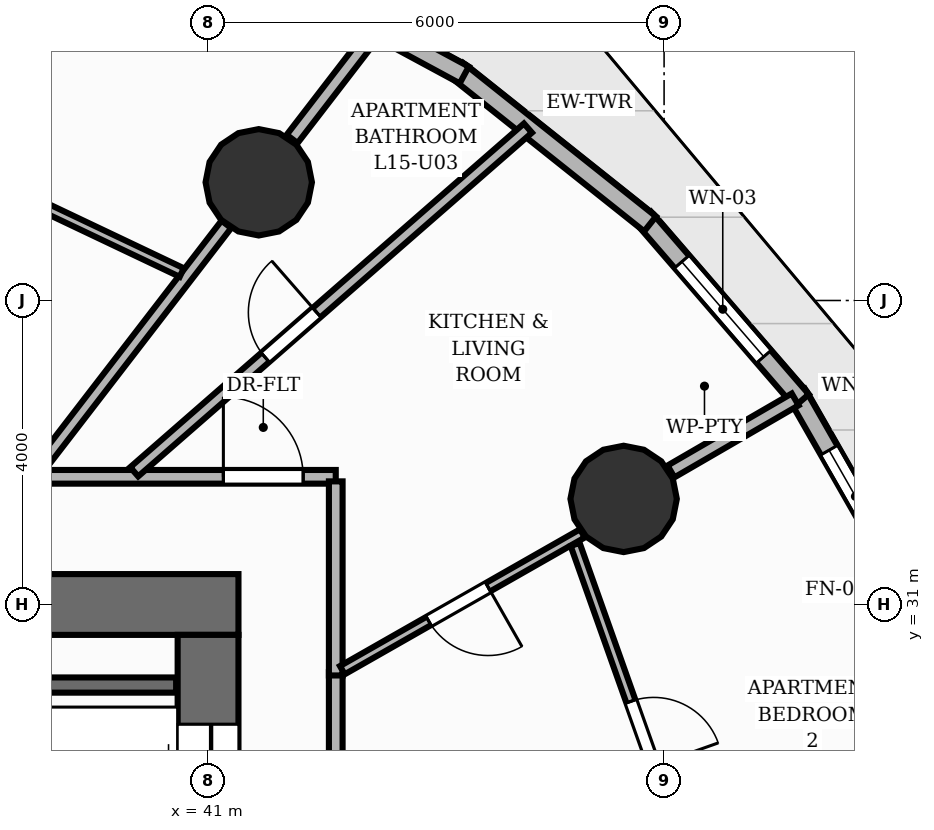
"""IFC4 building model, lengths in metres.
Left out: names, types, materials, properties, quantities, classifications, styles, units other than length and angle.
Written with IfcOpenShell. Run it as: python <this file> out.ifc"""

import sys

from ifc_helpers import new_model, si_unit, direction, frame, frame_2d, origin, origin_2d, place, context, subcontext, project, spatial, rectangle, circle, extrude, element, fill, save


model = new_model("IFC4")
c1 = context("Model", 3, precision=1e-05, world=origin(), true_north=direction((0.0, 1.0)))
c2 = subcontext(c1, "Body", "Model", "MODEL_VIEW")
j1 = project(units=[si_unit("LENGTHUNIT", "METRE"), si_unit("PLANEANGLEUNIT", "RADIAN")], contexts=[c1])
p1 = place(None, origin())
s1 = spatial("IfcSite", under=j1, at=p1, CompositionType="ELEMENT")
p2 = place(p1, origin())
s2 = spatial("IfcBuilding", under=s1, at=p2, CompositionType="ELEMENT")
p3 = place(p2, frame((0.0, 0.0, 53.6)))
s3 = spatial("IfcBuildingStorey", under=s2, at=p3, CompositionType="ELEMENT", Elevation=53.6)
p4 = place(p3, frame((22.6, 31.0, 0.0), z_axis=(0.0, 0.0, 1.0), x_axis=(1.0, 0.0, 0.0)))
e1 = element("IfcWall", 1, at=p4, inside=s3, PredefinedType="SHEAR", context=c2, shape_type="SweptSolid", body=[
    extrude(rectangle(XDim=18.8, YDim=0.8, at=frame_2d((9.4, 0.0))), origin(), (0.0, 0.0, 1.0), 3.2),
])
p5 = place(p4, frame((11.8, 0.0, 0.0)))
e2 = element("IfcOpeningElement", 2, at=p5, cuts=e1, PredefinedType="OPENING", context=c2, shape_type="SweptSolid", body=[
    extrude(rectangle(XDim=1.1, YDim=2.15, at=frame_2d((0.55, 1.075))), frame((0.0, 0.41, 0.0), z_axis=(0.0, -1.0, 0.0), x_axis=(1.0, 0.0, 0.0)), (0.0, 0.0, 1.0), 0.82),
])
p6 = place(p3, frame((41.0, 17.4, 0.0), z_axis=(0.0, 0.0, 1.0), x_axis=(0.0, 1.0, 0.0)))
e3 = element("IfcWall", 3, at=p6, inside=s3, PredefinedType="SHEAR", context=c2, shape_type="SweptSolid", body=[
    extrude(rectangle(XDim=13.2, YDim=0.8, at=frame_2d((6.6, 0.0))), origin(), (0.0, 0.0, 1.0), 3.2),
])
p7 = place(p6, frame((1.175, 0.0, 0.0)))
e4 = element("IfcOpeningElement", 4, at=p7, cuts=e3, PredefinedType="OPENING", context=c2, shape_type="SweptSolid", body=[
    extrude(rectangle(XDim=1.05, YDim=2.15, at=frame_2d((0.525, 1.075))), frame((0.0, 0.41, 0.0), z_axis=(0.0, -1.0, 0.0), x_axis=(1.0, 0.0, 0.0)), (0.0, 0.0, 1.0), 0.82),
])
p8 = place(p6, frame((4.425, 0.0, 0.0)))
e5 = element("IfcOpeningElement", 5, at=p8, cuts=e3, PredefinedType="OPENING", context=c2, shape_type="SweptSolid", body=[
    extrude(rectangle(XDim=1.05, YDim=2.15, at=frame_2d((0.525, 1.075))), frame((0.0, 0.41, 0.0), z_axis=(0.0, -1.0, 0.0), x_axis=(1.0, 0.0, 0.0)), (0.0, 0.0, 1.0), 0.82),
])
p9 = place(p6, frame((7.725, 0.0, 0.0)))
e6 = element("IfcOpeningElement", 6, at=p9, cuts=e3, PredefinedType="OPENING", context=c2, shape_type="SweptSolid", body=[
    extrude(rectangle(XDim=1.05, YDim=2.15, at=frame_2d((0.525, 1.075))), frame((0.0, 0.41, 0.0), z_axis=(0.0, -1.0, 0.0), x_axis=(1.0, 0.0, 0.0)), (0.0, 0.0, 1.0), 0.82),
])
p10 = place(p6, frame((10.975, 0.0, 0.0)))
e7 = element("IfcOpeningElement", 7, at=p10, cuts=e3, PredefinedType="OPENING", context=c2, shape_type="SweptSolid", body=[
    extrude(rectangle(XDim=1.05, YDim=2.15, at=frame_2d((0.525, 1.075))), frame((0.0, 0.41, 0.0), z_axis=(0.0, -1.0, 0.0), x_axis=(1.0, 0.0, 0.0)), (0.0, 0.0, 1.0), 0.82),
])
for number, where, z_axis, x_axis in (
    (8, (46.468, 32.389, 0.0), (0.0, 0.0, 1.0), (1.0, 0.0, 0.0)),
    (9, (41.667, 36.555, 0.0), (0.0, 0.0, 1.0), (1.0, 0.0, 0.0)),
):
    element("IfcColumn", number, at=place(p3, frame(where, z_axis=z_axis, x_axis=x_axis)), inside=s3, PredefinedType="COLUMN", context=c2, shape_type="SweptSolid", body=[
        extrude(circle(Radius=0.7, at=origin_2d()), origin(), (0.0, 0.0, 1.0), 3.2),
    ])
p11 = place(p3, frame((48.744, 33.777, 0.0), z_axis=(0.0, 0.0, 1.0), x_axis=(0.496155788519, -0.868233513243, 0.0)))
e10 = element("IfcWall", 10, at=p11, inside=s3, PredefinedType="SOLIDWALL", context=c2, shape_type="SweptSolid", body=[
    extrude(rectangle(XDim=3.121, YDim=0.25, at=frame_2d((1.56, 0.0))), origin(), (0.0, 0.0, 1.0), 2.96),
])
p12 = place(p11, frame((0.86, 0.0, 0.85)))
e11 = element("IfcOpeningElement", 11, at=p12, cuts=e10, PredefinedType="OPENING", context=c2, shape_type="SweptSolid", body=[
    extrude(rectangle(XDim=1.4, YDim=1.55, at=frame_2d((0.7, 0.775))), frame((0.0, 0.135, 0.0), z_axis=(0.0, -1.0, 0.0), x_axis=(1.0, 0.0, 0.0)), (0.0, 0.0, 1.0), 0.27),
])
p13 = place(p3, frame((46.734, 36.086, 0.0), z_axis=(0.0, 0.0, 1.0), x_axis=(0.653770062489, -0.75669327035, 0.0)))
e12 = element("IfcWall", 12, at=p13, inside=s3, PredefinedType="SOLIDWALL", context=c2, shape_type="SweptSolid", body=[
    extrude(rectangle(XDim=3.174, YDim=0.25, at=frame_2d((1.587, 0.0))), origin(), (0.0, 0.0, 1.0), 2.96),
])
p14 = place(p13, frame((0.762, 0.0, 0.85)))
e13 = element("IfcOpeningElement", 13, at=p14, cuts=e12, PredefinedType="OPENING", context=c2, shape_type="SweptSolid", body=[
    extrude(rectangle(XDim=1.65, YDim=1.55, at=frame_2d((0.825, 0.775))), frame((0.0, 0.135, 0.0), z_axis=(0.0, -1.0, 0.0), x_axis=(1.0, 0.0, 0.0)), (0.0, 0.0, 1.0), 0.27),
])
p15 = place(p3, frame((44.278, 38.029, 0.0), z_axis=(0.0, 0.0, 1.0), x_axis=(0.78232767864, -0.622867083119, 0.0)))
e14 = element("IfcWall", 14, at=p15, inside=s3, PredefinedType="SOLIDWALL", context=c2, shape_type="SweptSolid", body=[
    extrude(rectangle(XDim=3.244, YDim=0.25, at=frame_2d((1.622, 0.0))), origin(), (0.0, 0.0, 1.0), 2.96),
])
p16 = place(p3, frame((41.448, 39.546, 0.0), z_axis=(0.0, 0.0, 1.0), x_axis=(0.879811992908, -0.475321845843, 0.0)))
e15 = element("IfcWall", 15, at=p16, inside=s3, PredefinedType="SOLIDWALL", context=c2, shape_type="SweptSolid", body=[
    extrude(rectangle(XDim=3.323, YDim=0.25, at=frame_2d((1.661, 0.0))), origin(), (0.0, 0.0, 1.0), 2.96),
])
p17 = place(p3, frame((38.87, 29.94, 0.0), z_axis=(0.0, 0.0, 1.0), x_axis=(1.0, 0.0, 0.0)))
e16 = element("IfcWall", 16, at=p17, inside=s3, PredefinedType="SHEAR", context=c2, shape_type="SweptSolid", body=[
    extrude(rectangle(XDim=1.71, YDim=0.2, at=frame_2d((0.855, 0.0))), origin(), (0.0, 0.0, 1.0), 3.2),
])
p18 = place(p3, frame((47.091, 32.75, 0.0), z_axis=(0.0, 0.0, 1.0), x_axis=(0.865027823723, 0.501723892379, 0.0)))
e17 = element("IfcWall", 17, at=p18, inside=s3, PredefinedType="PARTITIONING", context=c2, shape_type="SweptSolid", body=[
    extrude(rectangle(XDim=1.889, YDim=0.18, at=frame_2d((0.944, 0.0))), origin(), (0.0, 0.0, 1.0), 2.178),
])
p19 = place(p3, frame((42.106, 37.126, 0.0), z_axis=(0.0, 0.0, 1.0), x_axis=(0.61002145357, 0.792384897752, 0.0)))
e18 = element("IfcWall", 18, at=p19, inside=s3, PredefinedType="PARTITIONING", context=c2, shape_type="SweptSolid", body=[
    extrude(rectangle(XDim=1.785, YDim=0.18, at=frame_2d((0.892, 0.0))), origin(), (0.0, 0.0, 1.0), 2.178),
])
p20 = place(p3, frame((42.68, 30.109, 0.0), z_axis=(0.0, 0.0, 1.0), x_axis=(0.0, -1.0, 0.0)))
e19 = element("IfcWall", 19, at=p20, inside=s3, PredefinedType="PARTITIONING", context=c2, shape_type="SweptSolid", body=[
    extrude(rectangle(XDim=14.789, YDim=0.18, at=frame_2d((7.395, 0.0))), origin(), (0.0, 0.0, 1.0), 2.955),
])
p21 = place(p20, frame((9.4, 0.0, 0.0)))
e20 = element("IfcOpeningElement", 20, at=p21, cuts=e19, PredefinedType="OPENING", context=c2, shape_type="SweptSolid", body=[
    extrude(rectangle(XDim=1.05, YDim=2.15, at=frame_2d((0.525, 1.075))), frame((0.0, 0.1, 0.0), z_axis=(0.0, -1.0, 0.0), x_axis=(1.0, 0.0, 0.0)), (0.0, 0.0, 1.0), 0.2),
])
p22 = place(p3, frame((33.988, 32.68, 0.0), z_axis=(0.0, 0.0, 1.0), x_axis=(1.0, 0.0, 0.0)))
e21 = element("IfcWall", 21, at=p22, inside=s3, PredefinedType="PARTITIONING", context=c2, shape_type="SweptSolid", body=[
    extrude(rectangle(XDim=8.692, YDim=0.18, at=frame_2d((4.346, 0.0))), origin(), (0.0, 0.0, 1.0), 2.955),
])
p23 = place(p22, frame((7.213, 0.0, 0.0)))
e22 = element("IfcOpeningElement", 22, at=p23, cuts=e21, PredefinedType="OPENING", context=c2, shape_type="SweptSolid", body=[
    extrude(rectangle(XDim=1.05, YDim=2.15, at=frame_2d((0.525, 1.075))), frame((0.0, 0.1, 0.0), z_axis=(0.0, -1.0, 0.0), x_axis=(1.0, 0.0, 0.0)), (0.0, 0.0, 1.0), 0.2),
])
p24 = place(p3, frame((42.68, 32.62, 0.0), z_axis=(0.0, 0.0, 1.0), x_axis=(0.0, -1.0, 0.0)))
e23 = element("IfcWall", 23, at=p24, inside=s3, PredefinedType="PARTITIONING", context=c2, shape_type="SweptSolid", body=[
    extrude(rectangle(XDim=2.554, YDim=0.18, at=frame_2d((1.277, 0.0))), origin(), (0.0, 0.0, 1.0), 2.955),
])
p25 = place(p3, frame((40.028, 32.746, 0.0), z_axis=(0.0, 0.0, 1.0), x_axis=(0.753328390337, 0.657644536442, 0.0)))
e24 = element("IfcWall", 24, at=p25, inside=s3, PredefinedType="PLUMBINGWALL", context=c2, shape_type="SweptSolid", body=[
    extrude(rectangle(XDim=6.876, YDim=0.16, at=frame_2d((3.438, 0.0))), origin(), (0.0, 0.0, 1.0), 2.955),
])
p26 = place(p25, frame((2.288, 0.0, 0.0)))
e25 = element("IfcOpeningElement", 25, at=p26, cuts=e24, PredefinedType="OPENING", context=c2, shape_type="SweptSolid", body=[
    extrude(rectangle(XDim=0.9, YDim=2.1, at=frame_2d((0.45, 1.05))), frame((0.0, 0.09, 0.0), z_axis=(0.0, -1.0, 0.0), x_axis=(1.0, 0.0, 0.0)), (0.0, 0.0, 1.0), 0.18),
])
p27 = place(p3, frame((45.925, 31.936, 0.0), z_axis=(0.0, 0.0, 1.0), x_axis=(-0.868837650683, -0.49509709831, 0.0)))
e26 = element("IfcWall", 26, at=p27, inside=s3, PredefinedType="PARTITIONING", context=c2, shape_type="SweptSolid", body=[
    extrude(rectangle(XDim=3.635, YDim=0.125, at=frame_2d((1.818, 0.0))), origin(), (0.0, 0.0, 1.0), 2.178),
])
p28 = place(p27, frame((1.428, 0.0, 0.0)))
e27 = element("IfcOpeningElement", 27, at=p28, cuts=e26, PredefinedType="OPENING", context=c2, shape_type="SweptSolid", body=[
    extrude(rectangle(XDim=0.9, YDim=2.1, at=frame_2d((0.45, 1.05))), frame((0.0, 0.073, 0.0), z_axis=(0.0, -1.0, 0.0), x_axis=(1.0, 0.0, 0.0)), (0.0, 0.0, 1.0), 0.145),
])
p29 = place(p3, frame((38.744, 32.759, 0.0), z_axis=(0.0, 0.0, 1.0), x_axis=(0.610079741913, 0.792340020766, 0.0)))
e28 = element("IfcWall", 28, at=p29, inside=s3, PredefinedType="PLUMBINGWALL", context=c2, shape_type="SweptSolid", body=[
    extrude(rectangle(XDim=4.092, YDim=0.16, at=frame_2d((2.046, 0.0))), origin(), (0.0, 0.0, 1.0), 2.178),
])
p30 = place(p3, frame((45.83, 31.79, 0.0), z_axis=(0.0, 0.0, 1.0), x_axis=(0.334664074365, -0.94233749651, 0.0)))
e29 = element("IfcWall", 29, at=p30, inside=s3, PredefinedType="PARTITIONING", context=c2, shape_type="SweptSolid", body=[
    extrude(rectangle(XDim=5.282, YDim=0.125, at=frame_2d((2.641, 0.0))), origin(), (0.0, 0.0, 1.0), 2.955),
])
p31 = place(p30, frame((2.191, 0.0, 0.0)))
e30 = element("IfcOpeningElement", 30, at=p31, cuts=e29, PredefinedType="OPENING", context=c2, shape_type="SweptSolid", body=[
    extrude(rectangle(XDim=0.9, YDim=2.1, at=frame_2d((0.45, 1.05))), frame((0.0, 0.073, 0.0), z_axis=(0.0, -1.0, 0.0), x_axis=(1.0, 0.0, 0.0)), (0.0, 0.0, 1.0), 0.145),
])
p32 = place(p3, frame((35.299, 37.911, 0.0), z_axis=(0.0, 0.0, 1.0), x_axis=(0.903280297513, -0.429050934185, 0.0)))
e31 = element("IfcWall", 31, at=p32, inside=s3, PredefinedType="PARTITIONING", context=c2, shape_type="SweptSolid", body=[
    extrude(rectangle(XDim=5.928, YDim=0.125, at=frame_2d((2.964, 0.0))), origin(), (0.0, 0.0, 1.0), 2.955),
])
p33 = place(p32, frame((2.514, 0.0, 0.0)))
e32 = element("IfcOpeningElement", 32, at=p33, cuts=e31, PredefinedType="OPENING", context=c2, shape_type="SweptSolid", body=[
    extrude(rectangle(XDim=0.9, YDim=2.1, at=frame_2d((0.45, 1.05))), frame((0.0, 0.073, 0.0), z_axis=(0.0, -1.0, 0.0), x_axis=(1.0, 0.0, 0.0)), (0.0, 0.0, 1.0), 0.145),
])
p34 = place(p12, origin())
e33 = element("IfcWindow", 33, at=p34, inside=s3, PartitioningType="SINGLE_PANEL", PredefinedType="WINDOW", context=c2, shape_type="SweptSolid", body=[
    extrude(rectangle(XDim=1.4, YDim=1.55, at=frame_2d((0.7, 0.775))), frame((0.0, 0.03, 0.0), z_axis=(0.0, -1.0, 0.0), x_axis=(1.0, 0.0, 0.0)), (0.0, 0.0, 1.0), 0.06),
])
fill(e11, e33)
p35 = place(p14, origin())
e34 = element("IfcWindow", 34, at=p35, inside=s3, PartitioningType="SINGLE_PANEL", PredefinedType="WINDOW", context=c2, shape_type="SweptSolid", body=[
    extrude(rectangle(XDim=1.65, YDim=1.55, at=frame_2d((0.825, 0.775))), frame((0.0, 0.03, 0.0), z_axis=(0.0, -1.0, 0.0), x_axis=(1.0, 0.0, 0.0)), (0.0, 0.0, 1.0), 0.06),
])
fill(e13, e34)
p36 = place(p10, origin())
e35 = element("IfcDoor", 35, at=p36, inside=s3, OperationType="DOUBLE_DOOR_SLIDING", PredefinedType="DOOR", context=c2, shape_type="SweptSolid", body=[
    extrude(rectangle(XDim=1.05, YDim=2.15, at=frame_2d((0.525, 1.075))), frame((0.0, 0.025, 0.0), z_axis=(0.0, -1.0, 0.0), x_axis=(1.0, 0.0, 0.0)), (0.0, 0.0, 1.0), 0.05),
])
fill(e7, e35)
p37 = place(p23, origin())
e36 = element("IfcDoor", 36, at=p37, inside=s3, OperationType="SINGLE_SWING_LEFT", PredefinedType="DOOR", context=c2, shape_type="SweptSolid", body=[
    extrude(rectangle(XDim=1.05, YDim=2.15, at=frame_2d((0.525, 1.075))), frame((0.0, 0.025, 0.0), z_axis=(0.0, -1.0, 0.0), x_axis=(1.0, 0.0, 0.0)), (0.0, 0.0, 1.0), 0.05),
])
fill(e22, e36)
p38 = place(p26, origin())
e37 = element("IfcDoor", 37, at=p38, inside=s3, OperationType="SINGLE_SWING_RIGHT", PredefinedType="DOOR", context=c2, shape_type="SweptSolid", body=[
    extrude(rectangle(XDim=0.9, YDim=2.1, at=frame_2d((0.45, 1.05))), frame((0.0, 0.025, 0.0), z_axis=(0.0, -1.0, 0.0), x_axis=(1.0, 0.0, 0.0)), (0.0, 0.0, 1.0), 0.05),
])
fill(e25, e37)
p39 = place(p28, origin())
e38 = element("IfcDoor", 38, at=p39, inside=s3, OperationType="SINGLE_SWING_LEFT", PredefinedType="DOOR", context=c2, shape_type="SweptSolid", body=[
    extrude(rectangle(XDim=0.9, YDim=2.1, at=frame_2d((0.45, 1.05))), frame((0.0, 0.025, 0.0), z_axis=(0.0, -1.0, 0.0), x_axis=(1.0, 0.0, 0.0)), (0.0, 0.0, 1.0), 0.05),
])
fill(e27, e38)
p40 = place(p31, origin())
e39 = element("IfcDoor", 39, at=p40, inside=s3, OperationType="SINGLE_SWING_RIGHT", PredefinedType="DOOR", context=c2, shape_type="SweptSolid", body=[
    extrude(rectangle(XDim=0.9, YDim=2.1, at=frame_2d((0.45, 1.05))), frame((0.0, 0.025, 0.0), z_axis=(0.0, -1.0, 0.0), x_axis=(1.0, 0.0, 0.0)), (0.0, 0.0, 1.0), 0.05),
])
fill(e30, e39)
save(model, sys.argv[1])
